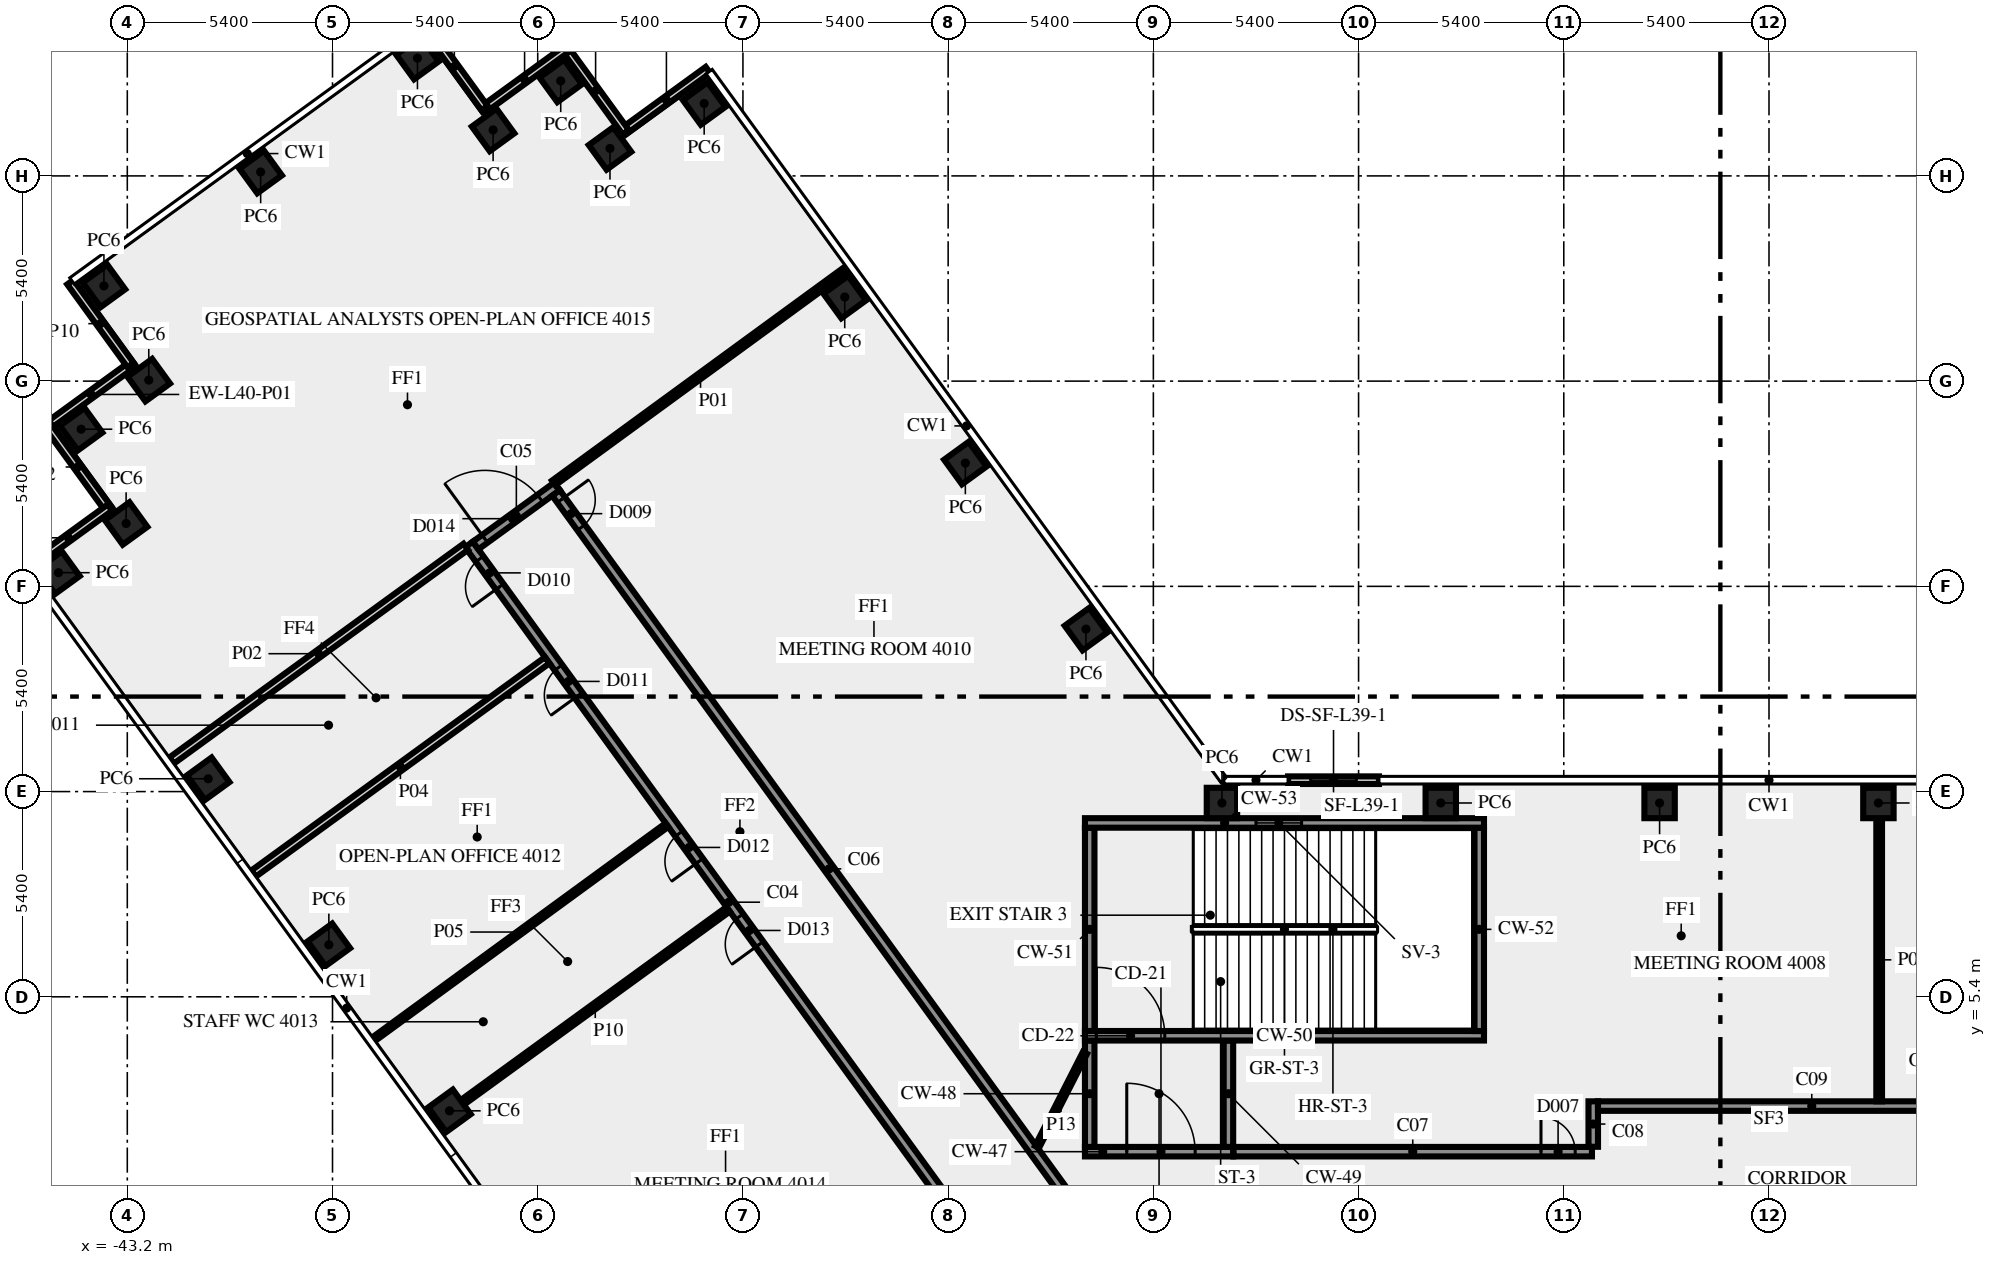
"""IFC4 building model, lengths in metres.
Left out: names, types, materials, properties, quantities, classifications, styles, units other than length and angle.
Written with IfcOpenShell. Run it as: python <this file> out.ifc"""

import sys

from ifc_helpers import new_model, si_unit, direction, frame, frame_2d, origin, origin_2d, place, context, subcontext, project, spatial, rectangle, extrude, element, fill, save


model = new_model("IFC4")
c1 = context("Model", 3, precision=1e-05, world=origin(), true_north=direction((0.0, 1.0)))
c2 = subcontext(c1, "Body", "Model", "MODEL_VIEW")
j1 = project(units=[si_unit("LENGTHUNIT", "METRE"), si_unit("PLANEANGLEUNIT", "RADIAN")], contexts=[c1])
p1 = place(None, origin())
s1 = spatial("IfcSite", under=j1, at=p1, CompositionType="ELEMENT")
p2 = place(p1, origin())
s2 = spatial("IfcBuilding", under=s1, at=p2, CompositionType="ELEMENT")
p3 = place(p2, frame((0.0, 0.0, 172.0)))
s3 = spatial("IfcBuildingStorey", under=s2, at=p3, CompositionType="ELEMENT", Elevation=172.0)
for number, where, z_axis, x_axis in (
    (1, (-17.974, 15.075, 0.0), (0.0, 0.0, 1.0), (-0.588, 0.809, 0.0)),
    (2, (-21.147, 19.444, 0.0), (0.0, 0.0, 1.0), (-0.588, 0.809, 0.0)),
    (3, (-24.321, 23.812, 0.0), (0.0, 0.0, 1.0), (-0.588, 0.809, 0.0)),
    (4, (-28.02, 28.905, 0.0), (0.0, 0.0, 1.0), (-0.809, -0.588, 0.0)),
    (5, (-30.499, 27.723, 0.0), (0.0, 0.0, 1.0), (-0.809, -0.588, 0.0)),
    (6, (-31.795, 29.5, 0.0), (0.0, 0.0, 1.0), (-0.588, 0.809, 0.0)),
    (7, (-33.574, 28.209, 0.0), (0.0, 0.0, 1.0), (-0.588, 0.809, 0.0)),
    (8, (-35.565, 30.1, 0.0), (0.0, 0.0, 1.0), (-0.809, -0.588, 0.0)),
    (9, (-39.691, 27.102, 0.0), (0.0, 0.0, 1.0), (-0.809, -0.588, 0.0)),
    (10, (-43.815, 24.105, 0.0), (0.0, 0.0, 1.0), (-0.809, -0.588, 0.0)),
    (11, (-42.635, 21.626, 0.0), (0.0, 0.0, 1.0), (-0.809, -0.588, 0.0)),
    (12, (-44.415, 20.335, 0.0), (0.0, 0.0, 1.0), (0.588, -0.809, 0.0)),
    (13, (-43.231, 17.854, 0.0), (0.0, 0.0, 1.0), (0.588, -0.809, 0.0)),
    (14, (-45.01, 16.56, 0.0), (0.0, 0.0, 1.0), (0.588, -0.809, 0.0)),
    (15, (-41.07, 11.137, 0.0), (0.0, 0.0, 1.0), (0.588, -0.809, 0.0)),
    (16, (-37.896, 6.769, 0.0), (0.0, 0.0, 1.0), (0.588, -0.809, 0.0)),
    (17, (-34.722, 2.4, 0.0), (0.0, 0.0, 1.0), (0.588, -0.809, 0.0)),
    (18, (2.879, 10.5, 0.0), (0.0, 0.0, 1.0), (-1.0, 0.0, 0.0)),
    (19, (-2.879, 10.5, 0.0), (0.0, 0.0, 1.0), (-1.0, 0.0, 0.0)),
    (20, (-8.637, 10.5, 0.0), (0.0, 0.0, 1.0), (-1.0, 0.0, 0.0)),
    (21, (-14.395, 10.5, 0.0), (0.0, 0.0, 1.0), (-1.0, 0.0, 0.0)),
):
    element("IfcColumn", number, at=place(p3, frame(where, z_axis=z_axis, x_axis=x_axis)), inside=s3, PredefinedType="COLUMN", context=c2, shape_type="SweptSolid", body=[
        extrude(rectangle(XDim=0.8, YDim=0.8, at=origin_2d()), origin(), (0.0, 0.0, 1.0), 3.65),
    ])
for number, where, z_axis, x_axis in (
    (22, (-43.061, 22.043, 0.0), (0.0, 0.0, 1.0), (-0.809, -0.588, 0.0)),
    (23, (-45.296, 20.434, 0.0), (0.0, 0.0, 1.0), (0.588, -0.809, 0.0)),
    (24, (-43.658, 18.272, 0.0), (0.0, 0.0, 1.0), (-0.809, -0.588, 0.0)),
    (25, (-27.921, 29.787, 0.0), (0.0, 0.0, 1.0), (-0.809, -0.588, 0.0)),
    (26, (-30.083, 28.149, 0.0), (0.0, 0.0, 1.0), (-0.588, 0.809, 0.0)),
    (27, (-31.654, 30.331, 0.0), (0.0, 0.0, 1.0), (-0.809, -0.588, 0.0)),
    (28, (-33.801, 28.786, 0.0), (0.0, 0.0, 1.0), (-0.588, 0.809, 0.0)),
    (29, (-44.699, 24.205, 0.0), (0.0, 0.0, 1.0), (0.588, -0.809, 0.0)),
):
    element("IfcWall", number, at=place(p3, frame(where, z_axis=z_axis, x_axis=x_axis)), inside=s3, PredefinedType="SOLIDWALL", context=c2, shape_type="SweptSolid", body=[
        extrude(rectangle(XDim=2.7, YDim=0.2, at=frame_2d((1.35, 0.0))), origin(), (0.0, 0.0, 1.0), 3.65),
    ])
p4 = place(p3, frame((-10.263, 11.1, 0.0), z_axis=(0.0, 0.0, 1.0), x_axis=(-1.0, 0.0, 0.0)))
e30 = element("IfcWall", 30, at=p4, inside=s3, PredefinedType="SOLIDWALL", context=c2, shape_type="SweptSolid", body=[
    extrude(rectangle(XDim=2.392, YDim=0.2, at=frame_2d((1.196, 0.0))), origin(), (0.0, 0.0, 1.0), 3.65),
])
p5 = place(p4, frame((0.596, 0.0, 1.0)))
e31 = element("IfcOpeningElement", 31, at=p5, cuts=e30, PredefinedType="OPENING", context=c2, shape_type="SweptSolid", body=[
    extrude(rectangle(XDim=1.2, YDim=1.2, at=frame_2d((0.6, 0.6))), frame((0.0, 0.11, 0.0), z_axis=(0.0, -1.0, 0.0), x_axis=(1.0, 0.0, 0.0)), (0.0, 0.0, 1.0), 0.22),
])
p6 = place(p3, frame((-18.0, 1.325, 0.0), z_axis=(0.0, 0.0, 1.0), x_axis=(1.0, 0.0, 0.0)))
e32 = element("IfcWall", 32, at=p6, inside=s3, PredefinedType="SHEAR", context=c2, shape_type="SweptSolid", body=[
    extrude(rectangle(XDim=3.9, YDim=0.25, at=frame_2d((1.95, 0.0))), origin(), (0.0, 0.0, 1.0), 3.65),
])
p7 = place(p6, frame((1.1, 0.0, 0.0)))
e33 = element("IfcOpeningElement", 33, at=p7, cuts=e32, PredefinedType="OPENING", context=c2, shape_type="SweptSolid", body=[
    extrude(rectangle(XDim=1.8, YDim=2.1, at=frame_2d((0.9, 1.05))), frame((0.0, 0.135, 0.0), z_axis=(0.0, -1.0, 0.0), x_axis=(1.0, 0.0, 0.0)), (0.0, 0.0, 1.0), 0.27),
])
for number, where, z_axis, x_axis in (
    (34, (-17.875, 1.45, 0.0), (0.0, 0.0, 1.0), (0.0, 1.0, 0.0)),
    (35, (-14.225, 1.45, 0.0), (0.0, 0.0, 1.0), (0.0, 1.0, 0.0)),
):
    element("IfcWall", number, at=place(p3, frame(where, z_axis=z_axis, x_axis=x_axis)), inside=s3, PredefinedType="SHEAR", context=c2, shape_type="SweptSolid", body=[
        extrude(rectangle(XDim=2.8, YDim=0.25, at=frame_2d((1.4, 0.0))), origin(), (0.0, 0.0, 1.0), 3.65),
    ])
p8 = place(p3, frame((-18.0, 4.375, 0.0), z_axis=(0.0, 0.0, 1.0), x_axis=(1.0, 0.0, 0.0)))
e36 = element("IfcWall", 36, at=p8, inside=s3, PredefinedType="SHEAR", context=c2, shape_type="SweptSolid", body=[
    extrude(rectangle(XDim=10.5, YDim=0.25, at=frame_2d((5.25, 0.0))), origin(), (0.0, 0.0, 1.0), 3.65),
])
p9 = place(p8, frame((0.3, 0.0, 0.0)))
e37 = element("IfcOpeningElement", 37, at=p9, cuts=e36, PredefinedType="OPENING", context=c2, shape_type="SweptSolid", body=[
    extrude(rectangle(XDim=1.8, YDim=2.1, at=frame_2d((0.9, 1.05))), frame((0.0, 0.135, 0.0), z_axis=(0.0, -1.0, 0.0), x_axis=(1.0, 0.0, 0.0)), (0.0, 0.0, 1.0), 0.27),
])
for number, where, z_axis, x_axis in (
    (38, (-17.875, 4.5, 0.0), (0.0, 0.0, 1.0), (0.0, 1.0, 0.0)),
    (39, (-7.625, 4.5, 0.0), (0.0, 0.0, 1.0), (0.0, 1.0, 0.0)),
):
    element("IfcWall", number, at=place(p3, frame(where, z_axis=z_axis, x_axis=x_axis)), inside=s3, PredefinedType="SHEAR", context=c2, shape_type="SweptSolid", body=[
        extrude(rectangle(XDim=5.35, YDim=0.25, at=frame_2d((2.675, 0.0))), origin(), (0.0, 0.0, 1.0), 3.65),
    ])
p10 = place(p3, frame((-18.0, 9.975, 0.0), z_axis=(0.0, 0.0, 1.0), x_axis=(1.0, 0.0, 0.0)))
e40 = element("IfcWall", 40, at=p10, inside=s3, PredefinedType="SHEAR", context=c2, shape_type="SweptSolid", body=[
    extrude(rectangle(XDim=10.5, YDim=0.25, at=frame_2d((5.25, 0.0))), origin(), (0.0, 0.0, 1.0), 3.65),
])
p11 = place(p10, frame((4.5, 0.0, 1.0)))
e41 = element("IfcOpeningElement", 41, at=p11, cuts=e40, PredefinedType="OPENING", context=c2, shape_type="SweptSolid", body=[
    extrude(rectangle(XDim=1.2, YDim=1.2, at=frame_2d((0.6, 0.6))), frame((0.0, 0.135, 0.0), z_axis=(0.0, -1.0, 0.0), x_axis=(1.0, 0.0, 0.0)), (0.0, 0.0, 1.0), 0.27),
])
p12 = place(p3, frame((-20.531, -1.523, 0.0), z_axis=(0.0, 0.0, 1.0), x_axis=(-0.587784239999, 0.809017729849, 0.0)))
e42 = element("IfcWall", 42, at=p12, inside=s3, PredefinedType="SOLIDWALL", context=c2, shape_type="SweptSolid", body=[
    extrude(rectangle(XDim=23.271, YDim=0.25, at=frame_2d((11.635, 0.0))), origin(), (0.0, 0.0, 1.0), 3.65),
])
p13 = place(p12, frame((18.366, 0.0, 0.0)))
e43 = element("IfcOpeningElement", 43, at=p13, cuts=e42, PredefinedType="OPENING", context=c2, shape_type="SweptSolid", body=[
    extrude(rectangle(XDim=0.9, YDim=2.1, at=frame_2d((0.45, 1.05))), frame((0.0, 0.135, 0.0), z_axis=(0.0, -1.0, 0.0), x_axis=(1.0, 0.0, 0.0)), (0.0, 0.0, 1.0), 0.27),
])
p14 = place(p12, frame((10.266, 0.0, 0.0)))
e44 = element("IfcOpeningElement", 44, at=p14, cuts=e42, PredefinedType="OPENING", context=c2, shape_type="SweptSolid", body=[
    extrude(rectangle(XDim=0.9, YDim=2.1, at=frame_2d((0.45, 1.05))), frame((0.0, 0.135, 0.0), z_axis=(0.0, -1.0, 0.0), x_axis=(1.0, 0.0, 0.0)), (0.0, 0.0, 1.0), 0.27),
])
p15 = place(p12, frame((21.896, 0.0, 0.0)))
e45 = element("IfcOpeningElement", 45, at=p15, cuts=e42, PredefinedType="OPENING", context=c2, shape_type="SweptSolid", body=[
    extrude(rectangle(XDim=0.9, YDim=2.1, at=frame_2d((0.45, 1.05))), frame((0.0, 0.135, 0.0), z_axis=(0.0, -1.0, 0.0), x_axis=(1.0, 0.0, 0.0)), (0.0, 0.0, 1.0), 0.27),
])
p16 = place(p12, frame((12.966, 0.0, 0.0)))
e46 = element("IfcOpeningElement", 46, at=p16, cuts=e42, PredefinedType="OPENING", context=c2, shape_type="SweptSolid", body=[
    extrude(rectangle(XDim=0.9, YDim=2.1, at=frame_2d((0.45, 1.05))), frame((0.0, 0.135, 0.0), z_axis=(0.0, -1.0, 0.0), x_axis=(1.0, 0.0, 0.0)), (0.0, 0.0, 1.0), 0.27),
])
p17 = place(p3, frame((-34.034, 17.275, 0.0), z_axis=(0.0, 0.0, 1.0), x_axis=(0.809006914995, 0.587799125119, 0.0)))
e47 = element("IfcWall", 47, at=p17, inside=s3, PredefinedType="SOLIDWALL", context=c2, shape_type="SweptSolid", body=[
    extrude(rectangle(XDim=2.65, YDim=0.25, at=frame_2d((1.325, 0.0))), origin(), (0.0, 0.0, 1.0), 3.65),
])
p18 = place(p17, frame((0.3, 0.0, 0.0)))
e48 = element("IfcOpeningElement", 48, at=p18, cuts=e47, PredefinedType="OPENING", context=c2, shape_type="SweptSolid", body=[
    extrude(rectangle(XDim=1.8, YDim=2.1, at=frame_2d((0.9, 1.05))), frame((0.0, 0.135, 0.0), z_axis=(0.0, -1.0, 0.0), x_axis=(1.0, 0.0, 0.0)), (0.0, 0.0, 1.0), 0.27),
])
p19 = place(p3, frame((-31.918, 18.658, 0.0), z_axis=(0.0, 0.0, 1.0), x_axis=(0.587788731405, -0.80901446664, 0.0)))
e49 = element("IfcWall", 49, at=p19, inside=s3, PredefinedType="SOLIDWALL", context=c2, shape_type="SweptSolid", body=[
    extrude(rectangle(XDim=24.453, YDim=0.25, at=frame_2d((12.227, 0.0))), origin(), (0.0, 0.0, 1.0), 3.65),
])
p20 = place(p19, frame((0.224, 0.0, 0.0)))
e50 = element("IfcOpeningElement", 50, at=p20, cuts=e49, PredefinedType="OPENING", context=c2, shape_type="SweptSolid", body=[
    extrude(rectangle(XDim=0.9, YDim=2.1, at=frame_2d((0.45, 1.05))), frame((0.0, 0.135, 0.0), z_axis=(0.0, -1.0, 0.0), x_axis=(1.0, 0.0, 0.0)), (0.0, 0.0, 1.0), 0.27),
])
p21 = place(p3, frame((-14.09, 1.325, 0.0), z_axis=(0.0, 0.0, 1.0), x_axis=(1.0, 0.0, 0.0)))
e51 = element("IfcWall", 51, at=p21, inside=s3, PredefinedType="SOLIDWALL", context=c2, shape_type="SweptSolid", body=[
    extrude(rectangle(XDim=9.431, YDim=0.25, at=frame_2d((4.716, 0.0))), origin(), (0.0, 0.0, 1.0), 3.65),
])
p22 = place(p21, frame((8.09, 0.0, 0.0)))
e52 = element("IfcOpeningElement", 52, at=p22, cuts=e51, PredefinedType="OPENING", context=c2, shape_type="SweptSolid", body=[
    extrude(rectangle(XDim=0.9, YDim=2.1, at=frame_2d((0.45, 1.05))), frame((0.0, 0.135, 0.0), z_axis=(0.0, -1.0, 0.0), x_axis=(1.0, 0.0, 0.0)), (0.0, 0.0, 1.0), 0.27),
])
p23 = place(p3, frame((-4.625, 1.454, 0.0), z_axis=(0.0, 0.0, 1.0), x_axis=(0.0, 1.0, 0.0)))
e53 = element("IfcWall", 53, at=p23, inside=s3, PredefinedType="SOLIDWALL", context=c2, shape_type="SweptSolid", body=[
    extrude(rectangle(XDim=1.196, YDim=0.25, at=frame_2d((0.598, 0.0))), origin(), (0.0, 0.0, 1.0), 3.65),
])
p24 = place(p3, frame((-4.5, 2.525, 0.0), z_axis=(0.0, 0.0, 1.0), x_axis=(1.0, 0.0, 0.0)))
e54 = element("IfcWall", 54, at=p24, inside=s3, PredefinedType="SOLIDWALL", context=c2, shape_type="SweptSolid", body=[
    extrude(rectangle(XDim=11.25, YDim=0.25, at=frame_2d((5.625, 0.0))), origin(), (0.0, 0.0, 1.0), 3.65),
])
p25 = place(p3, frame((-31.98, 18.922, 0.0), z_axis=(0.0, 0.0, 1.0), x_axis=(0.807588329082, 0.589746632657, 0.0)))
e55 = element("IfcWall", 55, at=p25, inside=s3, PredefinedType="PARTITIONING", context=c2, shape_type="SweptSolid", body=[
    extrude(rectangle(XDim=9.57, YDim=0.15, at=frame_2d((4.785, 0.0))), origin(), (0.0, 0.0, 1.0), 2.85),
])
p26 = place(p3, frame((-42.036, 11.615, 0.0), z_axis=(0.0, 0.0, 1.0), x_axis=(0.808985331811, 0.587828829605, 0.0)))
e56 = element("IfcWall", 56, at=p26, inside=s3, PredefinedType="SOLIDWALL", context=c2, shape_type="SweptSolid", body=[
    extrude(rectangle(XDim=9.57, YDim=0.2, at=frame_2d((4.785, 0.0))), origin(), (0.0, 0.0, 1.0), 2.85),
])
p27 = place(p3, frame((2.899, 10.095, 0.0), z_axis=(0.0, 0.0, 1.0), x_axis=(0.0, -1.0, 0.0)))
e57 = element("IfcWall", 57, at=p27, inside=s3, PredefinedType="PARTITIONING", context=c2, shape_type="SweptSolid", body=[
    extrude(rectangle(XDim=7.445, YDim=0.15, at=frame_2d((3.723, 0.0))), origin(), (0.0, 0.0, 1.0), 3.65),
])
p28 = place(p3, frame((-32.15, 14.256, 0.0), z_axis=(0.0, 0.0, 1.0), x_axis=(-0.809064299351, -0.587720137068, 0.0)))
e58 = element("IfcWall", 58, at=p28, inside=s3, PredefinedType="SOLIDWALL", context=c2, shape_type="SweptSolid", body=[
    extrude(rectangle(XDim=9.55, YDim=0.2, at=frame_2d((4.775, 0.0))), origin(), (0.0, 0.0, 1.0), 2.85),
])
p29 = place(p3, frame((-36.712, 4.288, 0.0), z_axis=(0.0, 0.0, 1.0), x_axis=(0.807606997933, 0.589721067023, 0.0)))
e59 = element("IfcWall", 59, at=p29, inside=s3, PredefinedType="PARTITIONING", context=c2, shape_type="SweptSolid", body=[
    extrude(rectangle(XDim=9.55, YDim=0.12, at=frame_2d((4.775, 0.0))), origin(), (0.0, 0.0, 1.0), 2.85),
])
p30 = place(p3, frame((-27.389, 7.703, 0.0), z_axis=(0.0, 0.0, 1.0), x_axis=(-0.809060825193, -0.587724919617, 0.0)))
e60 = element("IfcWall", 60, at=p30, inside=s3, PredefinedType="PARTITIONING", context=c2, shape_type="SweptSolid", body=[
    extrude(rectangle(XDim=8.645, YDim=0.15, at=frame_2d((4.322, 0.0))), origin(), (0.0, 0.0, 1.0), 3.65),
])
p31 = place(p3, frame((-19.261, 1.45, 0.0), z_axis=(0.0, 0.0, 1.0), x_axis=(0.453950796792, 0.891026752736, 0.0)))
e61 = element("IfcWall", 61, at=p31, inside=s3, PredefinedType="PARTITIONING", context=c2, shape_type="SweptSolid", body=[
    extrude(rectangle(XDim=2.778, YDim=0.12, at=frame_2d((1.389, 0.0))), origin(), (0.0, 0.0, 1.0), 3.65),
])
p32 = place(p5, origin())
e62 = element("IfcWindow", 62, at=p32, inside=s3, PartitioningType="SINGLE_PANEL", PredefinedType="WINDOW", context=c2, shape_type="SweptSolid", body=[
    extrude(rectangle(XDim=1.2, YDim=1.2, at=frame_2d((0.6, 0.6))), frame((0.0, 0.03, 0.0), z_axis=(0.0, -1.0, 0.0), x_axis=(1.0, 0.0, 0.0)), (0.0, 0.0, 1.0), 0.06),
])
fill(e31, e62)
p33 = place(p7, origin())
e63 = element("IfcDoor", 63, at=p33, inside=s3, OperationType="DOUBLE_DOOR_SINGLE_SWING", PredefinedType="DOOR", context=c2, shape_type="SweptSolid", body=[
    extrude(rectangle(XDim=1.8, YDim=2.1, at=frame_2d((0.9, 1.05))), frame((0.0, 0.025, 0.0), z_axis=(0.0, -1.0, 0.0), x_axis=(1.0, 0.0, 0.0)), (0.0, 0.0, 1.0), 0.05),
])
fill(e33, e63)
p34 = place(p9, origin())
e64 = element("IfcDoor", 64, at=p34, inside=s3, OperationType="DOUBLE_DOOR_SINGLE_SWING", PredefinedType="DOOR", context=c2, shape_type="SweptSolid", body=[
    extrude(rectangle(XDim=1.8, YDim=2.1, at=frame_2d((0.9, 1.05))), frame((0.0, 0.025, 0.0), z_axis=(0.0, -1.0, 0.0), x_axis=(1.0, 0.0, 0.0)), (0.0, 0.0, 1.0), 0.05),
])
fill(e37, e64)
p35 = place(p11, origin())
e65 = element("IfcWindow", 65, at=p35, inside=s3, PartitioningType="SINGLE_PANEL", PredefinedType="WINDOW", context=c2, shape_type="SweptSolid", body=[
    extrude(rectangle(XDim=1.2, YDim=1.2, at=frame_2d((0.6, 0.6))), frame((0.0, 0.03, 0.0), z_axis=(0.0, -1.0, 0.0), x_axis=(1.0, 0.0, 0.0)), (0.0, 0.0, 1.0), 0.06),
])
fill(e41, e65)
p36 = place(p18, origin())
e66 = element("IfcDoor", 66, at=p36, inside=s3, OperationType="DOUBLE_DOOR_SINGLE_SWING", PredefinedType="DOOR", context=c2, shape_type="SweptSolid", body=[
    extrude(rectangle(XDim=1.8, YDim=2.1, at=frame_2d((0.9, 1.05))), frame((0.0, 0.025, 0.0), z_axis=(0.0, -1.0, 0.0), x_axis=(1.0, 0.0, 0.0)), (0.0, 0.0, 1.0), 0.05),
])
fill(e48, e66)
p37 = place(p13, origin())
e67 = element("IfcDoor", 67, at=p37, inside=s3, OperationType="SINGLE_SWING_RIGHT", PredefinedType="DOOR", context=c2, shape_type="SweptSolid", body=[
    extrude(rectangle(XDim=0.9, YDim=2.1, at=frame_2d((0.45, 1.05))), frame((0.0, 0.025, 0.0), z_axis=(0.0, -1.0, 0.0), x_axis=(1.0, 0.0, 0.0)), (0.0, 0.0, 1.0), 0.05),
])
fill(e43, e67)
p38 = place(p22, origin())
e68 = element("IfcDoor", 68, at=p38, inside=s3, OperationType="SINGLE_SWING_RIGHT", PredefinedType="DOOR", context=c2, shape_type="SweptSolid", body=[
    extrude(rectangle(XDim=0.9, YDim=2.1, at=frame_2d((0.45, 1.05))), frame((0.0, 0.025, 0.0), z_axis=(0.0, -1.0, 0.0), x_axis=(1.0, 0.0, 0.0)), (0.0, 0.0, 1.0), 0.05),
])
fill(e52, e68)
p39 = place(p20, origin())
e69 = element("IfcDoor", 69, at=p39, inside=s3, OperationType="SINGLE_SWING_LEFT", PredefinedType="DOOR", context=c2, shape_type="SweptSolid", body=[
    extrude(rectangle(XDim=0.9, YDim=2.1, at=frame_2d((0.45, 1.05))), frame((0.0, 0.025, 0.0), z_axis=(0.0, -1.0, 0.0), x_axis=(1.0, 0.0, 0.0)), (0.0, 0.0, 1.0), 0.05),
])
fill(e50, e69)
p40 = place(p14, origin())
e70 = element("IfcDoor", 70, at=p40, inside=s3, OperationType="SINGLE_SWING_RIGHT", PredefinedType="DOOR", context=c2, shape_type="SweptSolid", body=[
    extrude(rectangle(XDim=0.9, YDim=2.1, at=frame_2d((0.45, 1.05))), frame((0.0, 0.025, 0.0), z_axis=(0.0, -1.0, 0.0), x_axis=(1.0, 0.0, 0.0)), (0.0, 0.0, 1.0), 0.05),
])
fill(e44, e70)
p41 = place(p15, origin())
e71 = element("IfcDoor", 71, at=p41, inside=s3, OperationType="SINGLE_SWING_RIGHT", PredefinedType="DOOR", context=c2, shape_type="SweptSolid", body=[
    extrude(rectangle(XDim=0.9, YDim=2.1, at=frame_2d((0.45, 1.05))), frame((0.0, 0.025, 0.0), z_axis=(0.0, -1.0, 0.0), x_axis=(1.0, 0.0, 0.0)), (0.0, 0.0, 1.0), 0.05),
])
fill(e45, e71)
p42 = place(p16, origin())
e72 = element("IfcDoor", 72, at=p42, inside=s3, OperationType="SINGLE_SWING_RIGHT", PredefinedType="DOOR", context=c2, shape_type="SweptSolid", body=[
    extrude(rectangle(XDim=0.9, YDim=2.1, at=frame_2d((0.45, 1.05))), frame((0.0, 0.025, 0.0), z_axis=(0.0, -1.0, 0.0), x_axis=(1.0, 0.0, 0.0)), (0.0, 0.0, 1.0), 0.05),
])
fill(e46, e72)
save(model, sys.argv[1])
